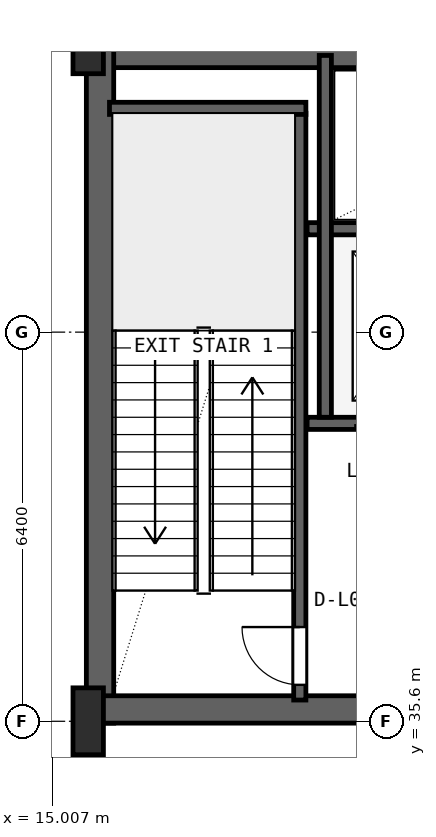
"""IFC4 building model, lengths in metres.
Left out: names, types, materials, properties, quantities, classifications, styles, units other than length and angle.
Written with IfcOpenShell. Run it as: python <this file> out.ifc"""

import sys

from ifc_helpers import new_model, si_unit, direction, frame, frame_2d, origin, origin_2d, place, context, subcontext, project, spatial, rectangle, i_section, extrude, source, transform, mapped, element, fill, save


model = new_model("IFC4")
c1 = context("Model", 3, precision=1e-05, world=origin(), true_north=direction((0.0, 1.0)))
c2 = subcontext(c1, "Body", "Model", "MODEL_VIEW")
j1 = project(units=[si_unit("LENGTHUNIT", "METRE"), si_unit("PLANEANGLEUNIT", "RADIAN")], contexts=[c1])
p1 = place(None, origin())
s1 = spatial("IfcSite", under=j1, at=p1, CompositionType="ELEMENT")
p2 = place(p1, origin())
s2 = spatial("IfcBuilding", under=s1, at=p2, CompositionType="ELEMENT")
p3 = place(p2, frame((0.0, 0.0, 22.2)))
s3 = spatial("IfcBuildingStorey", under=s2, at=p3, CompositionType="ELEMENT", Elevation=22.2)
p4 = place(p3, frame((15.6, 46.575, 0.0), z_axis=(0.0, 0.0, 1.0), x_axis=(1.0, 0.0, 0.0)))
e1 = element("IfcWall", 1, at=p4, inside=s3, PredefinedType="SHEAR", context=c2, shape_type="SweptSolid", body=[
    extrude(rectangle(XDim=36.8, YDim=0.45, at=frame_2d((18.4, 0.0))), origin(), (0.0, 0.0, 1.0), 5.08),
])
p5 = place(p3, frame((15.795, 35.57, 0.0), z_axis=(0.0, 0.0, 1.0), x_axis=(0.0, 1.0, 0.0)))
e2 = element("IfcWall", 2, at=p5, inside=s3, PredefinedType="SHEAR", context=c2, shape_type="SweptSolid", body=[
    extrude(rectangle(XDim=11.23, YDim=0.45, at=frame_2d((5.615, 0.0))), origin(), (0.0, 0.0, 1.0), 5.08),
])
p6 = place(p3, frame((15.57, 35.795, 0.0), z_axis=(0.0, 0.0, 1.0), x_axis=(1.0, 0.0, 0.0)))
e3 = element("IfcWall", 3, at=p6, inside=s3, PredefinedType="SHEAR", context=c2, shape_type="SweptSolid", body=[
    extrude(rectangle(XDim=9.23, YDim=0.45, at=frame_2d((4.615, 0.0))), origin(), (0.0, 0.0, 1.0), 5.08),
])
p7 = place(p6, frame((5.4, 0.0, 0.0)))
e4 = element("IfcOpeningElement", 4, at=p7, cuts=e3, PredefinedType="OPENING", context=c2, shape_type="SweptSolid", body=[
    extrude(rectangle(XDim=1.0, YDim=2.1, at=frame_2d((0.5, 1.05))), frame((0.0, 0.235, 0.0), z_axis=(0.0, -1.0, 0.0), x_axis=(1.0, 0.0, 0.0)), (0.0, 0.0, 1.0), 0.47),
])
m1 = source(origin(), c2, "Body", "SweptSolid", [
    extrude(i_section(OverallWidth=0.5, OverallDepth=1.1, WebThickness=0.018, FlangeThickness=0.032, FilletRadius=0.018, at=origin_2d()), origin(), (0.0, 0.0, 1.0), 5.4),
])
for number, where, z_axis, x_axis in (
    (5, (15.6, 35.6, 0.0), (0.0, 0.0, 1.0), (1.0, 0.0, 0.0)),
    (6, (15.6, 46.8, 0.0), (0.0, 0.0, 1.0), (1.0, 0.0, 0.0)),
):
    element("IfcColumn", number, at=place(p3, frame(where, z_axis=z_axis, x_axis=x_axis)), inside=s3, PredefinedType="COLUMN", context=c2, shape_type="MappedRepresentation", body=[
        mapped(m1, transform((0.0, 0.0, 0.0), x_axis=(1.0, 0.0, 0.0), y_axis=(0.0, 1.0, 0.0), z_axis=(0.0, 0.0, 1.0), scale=1.0)),
    ])
p8 = place(p3, frame((19.08, 35.95, 0.0), z_axis=(0.0, 0.0, 1.0), x_axis=(0.0, 1.0, 0.0)))
e7 = element("IfcWall", 7, at=p8, inside=s3, PredefinedType="SHEAR", context=c2, shape_type="SweptSolid", body=[
    extrude(rectangle(XDim=9.65, YDim=0.2, at=frame_2d((4.825, 0.0))), origin(), (0.0, 0.0, 1.0), 5.08),
])
p9 = place(p8, frame((0.25, 0.0, 0.0)))
e8 = element("IfcOpeningElement", 8, at=p9, cuts=e7, PredefinedType="OPENING", context=c2, shape_type="SweptSolid", body=[
    extrude(rectangle(XDim=0.95, YDim=2.1, at=frame_2d((0.475, 1.05))), frame((0.0, 0.11, 0.0), z_axis=(0.0, -1.0, 0.0), x_axis=(1.0, 0.0, 0.0)), (0.0, 0.0, 1.0), 0.22),
])
p10 = place(p3, frame((15.95, 45.68, 0.0), z_axis=(0.0, 0.0, 1.0), x_axis=(1.0, 0.0, 0.0)))
e9 = element("IfcWall", 9, at=p10, inside=s3, PredefinedType="SHEAR", context=c2, shape_type="SweptSolid", body=[
    extrude(rectangle(XDim=3.23, YDim=0.2, at=frame_2d((1.615, 0.0))), origin(), (0.0, 0.0, 1.0), 5.08),
])
p11 = place(p3, frame((19.2, 40.5, 0.0), z_axis=(0.0, 0.0, 1.0), x_axis=(1.0, 0.0, 0.0)))
e10 = element("IfcWall", 10, at=p11, inside=s3, PredefinedType="SHEAR", context=c2, shape_type="SweptSolid", body=[
    extrude(rectangle(XDim=5.52, YDim=0.2, at=frame_2d((2.76, 0.0))), origin(), (0.0, 0.0, 1.0), 5.08),
])
p12 = place(p11, frame((1.05, 0.0, 0.0)))
e11 = element("IfcOpeningElement", 11, at=p12, cuts=e10, PredefinedType="OPENING", context=c2, shape_type="SweptSolid", body=[
    extrude(rectangle(XDim=1.1, YDim=2.18, at=frame_2d((0.55, 1.09))), frame((0.0, 0.11, 0.0), z_axis=(0.0, -1.0, 0.0), x_axis=(1.0, 0.0, 0.0)), (0.0, 0.0, 1.0), 0.22),
])
p13 = place(p11, frame((3.65, 0.0, 0.0)))
e12 = element("IfcOpeningElement", 12, at=p13, cuts=e10, PredefinedType="OPENING", context=c2, shape_type="SweptSolid", body=[
    extrude(rectangle(XDim=1.1, YDim=2.18, at=frame_2d((0.55, 1.09))), frame((0.0, 0.11, 0.0), z_axis=(0.0, -1.0, 0.0), x_axis=(1.0, 0.0, 0.0)), (0.0, 0.0, 1.0), 0.22),
])
p14 = place(p3, frame((19.2, 43.7, 0.0), z_axis=(0.0, 0.0, 1.0), x_axis=(1.0, 0.0, 0.0)))
e13 = element("IfcWall", 13, at=p14, inside=s3, PredefinedType="SHEAR", context=c2, shape_type="SweptSolid", body=[
    extrude(rectangle(XDim=5.52, YDim=0.2, at=frame_2d((2.76, 0.0))), origin(), (0.0, 0.0, 1.0), 5.08),
])
p15 = place(p3, frame((19.5, 40.6, 0.0), z_axis=(0.0, 0.0, 1.0), x_axis=(0.0, 1.0, 0.0)))
e14 = element("IfcWall", 14, at=p15, inside=s3, PredefinedType="SHEAR", context=c2, shape_type="SweptSolid", body=[
    extrude(rectangle(XDim=5.95, YDim=0.2, at=frame_2d((2.975, 0.0))), origin(), (0.0, 0.0, 1.0), 5.08),
])
m2 = source(origin(), c2, "Body", "SweptSolid", [
    extrude(rectangle(XDim=0.95, YDim=2.1, at=frame_2d((0.475, 1.05))), frame((0.0, 0.025, 0.0), z_axis=(0.0, -1.0, 0.0), x_axis=(1.0, 0.0, 0.0)), (0.0, 0.0, 1.0), 0.05),
])
p16 = place(p9, origin())
e15 = element("IfcDoor", 15, at=p16, inside=s3, OperationType="SINGLE_SWING_RIGHT", PredefinedType="DOOR", context=c2, shape_type="MappedRepresentation", body=[
    mapped(m2, transform((0.0, 0.0, 0.0), x_axis=(1.0, 0.0, 0.0), y_axis=(0.0, 1.0, 0.0), z_axis=(0.0, 0.0, 1.0), scale=1.0)),
])
fill(e8, e15)
save(model, sys.argv[1])
